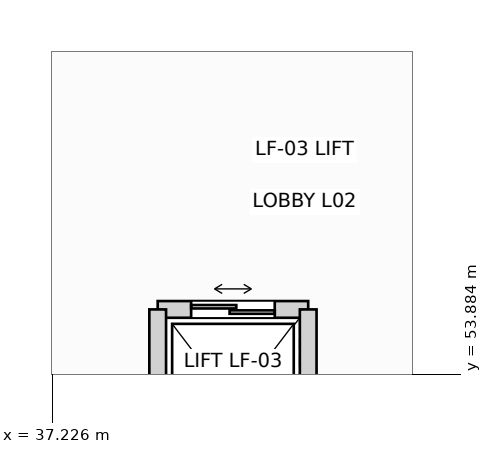
"""IFC4 building model, lengths in metres.
Left out: names, types, materials, properties, quantities, classifications, styles, units other than length and angle.
Written with IfcOpenShell. Run it as: python <this file> out.ifc"""

import sys

from ifc_helpers import new_model, si_unit, direction, frame, frame_2d, origin, place, context, subcontext, project, spatial, rectangle, extrude, element, fill, save


model = new_model("IFC4")
c1 = context("Model", 3, precision=1e-05, world=origin(), true_north=direction((0.0, 1.0)))
c2 = subcontext(c1, "Body", "Model", "MODEL_VIEW")
j1 = project(units=[si_unit("LENGTHUNIT", "METRE"), si_unit("PLANEANGLEUNIT", "RADIAN")], contexts=[c1])
p1 = place(None, origin())
s1 = spatial("IfcSite", under=j1, at=p1, CompositionType="ELEMENT")
p2 = place(p1, origin())
s2 = spatial("IfcBuilding", under=s1, at=p2, CompositionType="ELEMENT")
p3 = place(p2, frame((0.0, 0.0, 11.4)))
s3 = spatial("IfcBuildingStorey", under=s2, at=p3, CompositionType="ELEMENT", Elevation=11.4)
p4 = place(p3, frame((38.61, 54.74, 0.0), z_axis=(0.0, 0.0, 1.0), x_axis=(1.0, 0.0, 0.0)))
e1 = element("IfcWall", 1, at=p4, inside=s3, PredefinedType="PARTITIONING", context=c2, shape_type="SweptSolid", body=[
    extrude(rectangle(XDim=1.98, YDim=0.22, at=frame_2d((0.99, 0.0))), origin(), (0.0, 0.0, 1.0), 5.085),
])
p5 = place(p4, frame((0.44, 0.0, 0.0)))
e2 = element("IfcOpeningElement", 2, at=p5, cuts=e1, PredefinedType="OPENING", context=c2, shape_type="SweptSolid", body=[
    extrude(rectangle(XDim=1.1, YDim=2.18, at=frame_2d((0.55, 1.09))), frame((0.0, 0.12, 0.0), z_axis=(0.0, -1.0, 0.0), x_axis=(1.0, 0.0, 0.0)), (0.0, 0.0, 1.0), 0.24),
])
for number, where, z_axis, x_axis in (
    (3, (38.61, 52.26, 0.0), (0.0, 0.0, 1.0), (0.0, 1.0, 0.0)),
    (4, (40.59, 52.26, 0.0), (0.0, 0.0, 1.0), (0.0, 1.0, 0.0)),
):
    element("IfcWall", number, at=place(p3, frame(where, z_axis=z_axis, x_axis=x_axis)), inside=s3, PredefinedType="PARTITIONING", context=c2, shape_type="SweptSolid", body=[
        extrude(rectangle(XDim=2.48, YDim=0.22, at=frame_2d((1.24, 0.0))), origin(), (0.0, 0.0, 1.0), 5.085),
    ])
p6 = place(p5, origin())
e5 = element("IfcDoor", 5, at=p6, inside=s3, OperationType="DOUBLE_DOOR_SLIDING", PredefinedType="DOOR", context=c2, shape_type="SweptSolid", body=[
    extrude(rectangle(XDim=1.1, YDim=2.18, at=frame_2d((0.55, 1.09))), frame((0.0, 0.025, 0.0), z_axis=(0.0, -1.0, 0.0), x_axis=(1.0, 0.0, 0.0)), (0.0, 0.0, 1.0), 0.05),
])
fill(e2, e5)
save(model, sys.argv[1])
